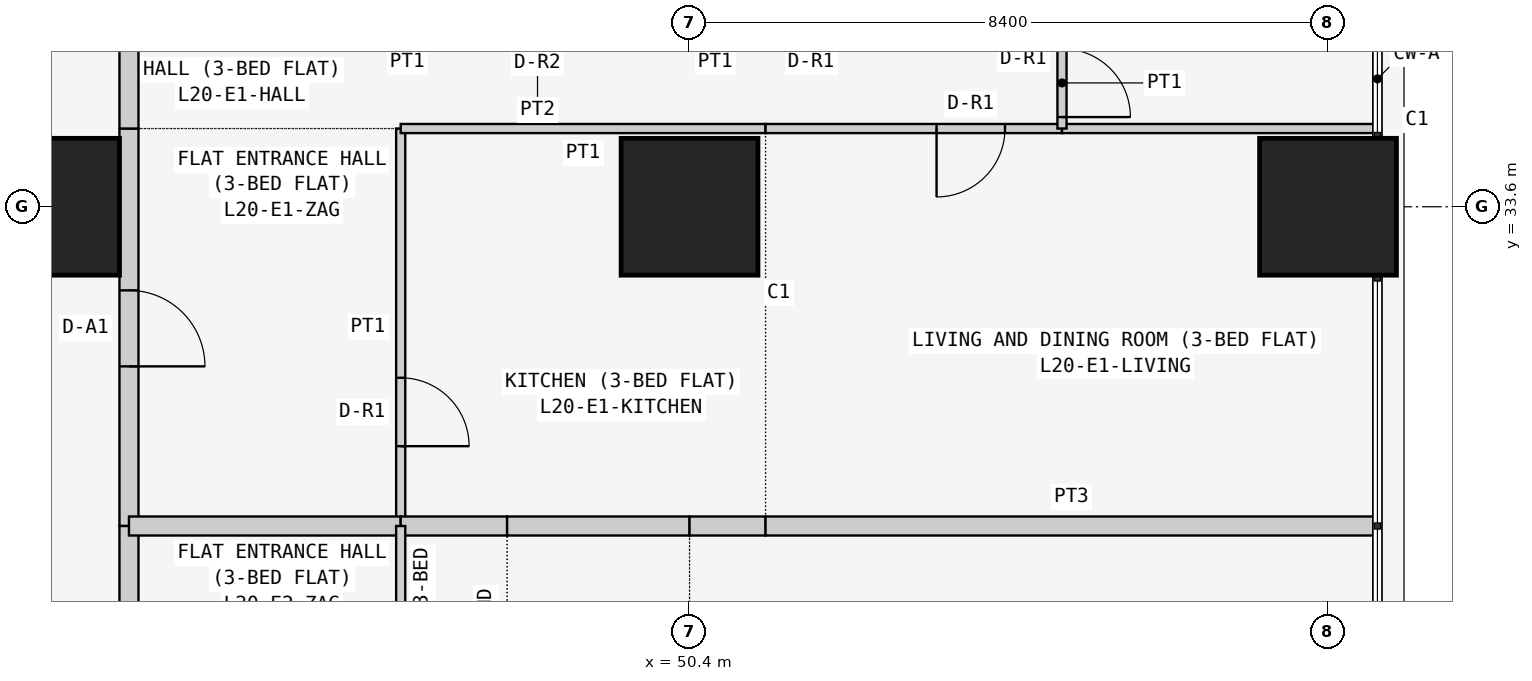
"""IFC4 building model, lengths in metres.
Left out: names, types, materials, properties, quantities, classifications, styles, units other than length and angle.
Written with IfcOpenShell. Run it as: python <this file> out.ifc"""

import sys

from ifc_helpers import new_model, si_unit, direction, frame, frame_2d, origin, origin_2d, place, context, subcontext, project, spatial, rectangle, extrude, element, fill, save


model = new_model("IFC4")
c1 = context("Model", 3, precision=1e-05, world=origin(), true_north=direction((0.0, 1.0)))
c2 = subcontext(c1, "Body", "Model", "MODEL_VIEW")
j1 = project(units=[si_unit("LENGTHUNIT", "METRE"), si_unit("PLANEANGLEUNIT", "RADIAN")], contexts=[c1])
p1 = place(None, origin())
s1 = spatial("IfcSite", under=j1, at=p1, CompositionType="ELEMENT")
p2 = place(p1, origin())
s2 = spatial("IfcBuilding", under=s1, at=p2, CompositionType="ELEMENT")
p3 = place(p2, frame((0.0, 0.0, 81.3)))
s3 = spatial("IfcBuildingStorey", under=s2, at=p3, CompositionType="ELEMENT", Elevation=81.3)
for number, where, z_axis, x_axis in (
    (1, (42.0, 33.6, 0.0), (0.0, 0.0, 1.0), (1.0, 0.0, 0.0)),
    (2, (50.4, 33.6, 0.0), (0.0, 0.0, 1.0), (1.0, 0.0, 0.0)),
    (3, (58.8, 33.6, 0.0), (0.0, 0.0, 1.0), (1.0, 0.0, 0.0)),
):
    element("IfcColumn", number, at=place(p3, frame(where, z_axis=z_axis, x_axis=x_axis)), inside=s3, PredefinedType="COLUMN", context=c2, shape_type="SweptSolid", body=[
        extrude(rectangle(XDim=1.8, YDim=1.8, at=origin_2d()), origin(), (0.0, 0.0, 1.0), 3.6),
    ])
p4 = place(p3, frame((43.025, 34.629, 0.0), z_axis=(0.0, 0.0, 1.0), x_axis=(0.0, -1.0, 0.0)))
e4 = element("IfcWall", 4, at=p4, inside=s3, PredefinedType="PARTITIONING", context=c2, shape_type="SweptSolid", body=[
    extrude(rectangle(XDim=5.229, YDim=0.25, at=frame_2d((2.615, 0.0))), origin(), (0.0, 0.0, 1.0), 3.45),
])
p5 = place(p4, frame((2.129, 0.0, 0.0)))
e5 = element("IfcOpeningElement", 5, at=p5, cuts=e4, PredefinedType="OPENING", context=c2, shape_type="SweptSolid", body=[
    extrude(rectangle(XDim=1.0, YDim=2.1, at=frame_2d((0.5, 1.05))), frame((0.0, 0.135, 0.0), z_axis=(0.0, -1.0, 0.0), x_axis=(1.0, 0.0, 0.0)), (0.0, 0.0, 1.0), 0.27),
])
p6 = place(p3, frame((43.025, 35.829, 0.0), z_axis=(0.0, 0.0, 1.0), x_axis=(0.0, -1.0, 0.0)))
e6 = element("IfcWall", 6, at=p6, inside=s3, PredefinedType="PARTITIONING", context=c2, shape_type="SweptSolid", body=[
    extrude(rectangle(XDim=1.2, YDim=0.25, at=frame_2d((0.6, 0.0))), origin(), (0.0, 0.0, 1.0), 3.45),
])
p7 = place(p3, frame((43.025, 29.4, 0.0), z_axis=(0.0, 0.0, 1.0), x_axis=(0.0, -1.0, 0.0)))
e7 = element("IfcWall", 7, at=p7, inside=s3, PredefinedType="PARTITIONING", context=c2, shape_type="SweptSolid", body=[
    extrude(rectangle(XDim=5.229, YDim=0.25, at=frame_2d((2.615, 0.0))), origin(), (0.0, 0.0, 1.0), 3.45),
])
p8 = place(p7, frame((2.1, 0.0, 0.0)))
e8 = element("IfcOpeningElement", 8, at=p8, cuts=e7, PredefinedType="OPENING", context=c2, shape_type="SweptSolid", body=[
    extrude(rectangle(XDim=1.0, YDim=2.1, at=frame_2d((0.5, 1.05))), frame((0.0, 0.135, 0.0), z_axis=(0.0, -1.0, 0.0), x_axis=(1.0, 0.0, 0.0)), (0.0, 0.0, 1.0), 0.27),
])
p9 = place(p3, frame((46.6, 29.4, 0.0), z_axis=(0.0, 0.0, 1.0), x_axis=(0.0, 1.0, 0.0)))
e9 = element("IfcWall", 9, at=p9, inside=s3, PredefinedType="PARTITIONING", context=c2, shape_type="SweptSolid", body=[
    extrude(rectangle(XDim=5.229, YDim=0.12, at=frame_2d((2.615, 0.0))), origin(), (0.0, 0.0, 1.0), 3.45),
])
p10 = place(p9, frame((1.05, 0.0, 0.0)))
e10 = element("IfcOpeningElement", 10, at=p10, cuts=e9, PredefinedType="OPENING", context=c2, shape_type="SweptSolid", body=[
    extrude(rectangle(XDim=0.9, YDim=2.1, at=frame_2d((0.45, 1.05))), frame((0.0, 0.07, 0.0), z_axis=(0.0, -1.0, 0.0), x_axis=(1.0, 0.0, 0.0)), (0.0, 0.0, 1.0), 0.14),
])
p11 = place(p3, frame((43.025, 29.4, 0.0), z_axis=(0.0, 0.0, 1.0), x_axis=(1.0, 0.0, 0.0)))
e11 = element("IfcWall", 11, at=p11, inside=s3, PredefinedType="PARTITIONING", context=c2, shape_type="SweptSolid", body=[
    extrude(rectangle(XDim=3.575, YDim=0.25, at=frame_2d((1.788, 0.0))), origin(), (0.0, 0.0, 1.0), 3.45),
])
p12 = place(p3, frame((51.4, 34.629, 0.0), z_axis=(0.0, 0.0, 1.0), x_axis=(-1.0, 0.0, 0.0)))
e12 = element("IfcWall", 12, at=p12, inside=s3, PredefinedType="PARTITIONING", context=c2, shape_type="SweptSolid", body=[
    extrude(rectangle(XDim=4.8, YDim=0.12, at=frame_2d((2.4, 0.0))), origin(), (0.0, 0.0, 1.0), 3.45),
])
p13 = place(p3, frame((46.6, 29.4, 0.0), z_axis=(0.0, 0.0, 1.0), x_axis=(1.0, 0.0, 0.0)))
e13 = element("IfcWall", 13, at=p13, inside=s3, PredefinedType="PARTITIONING", context=c2, shape_type="SweptSolid", body=[
    extrude(rectangle(XDim=1.4, YDim=0.25, at=frame_2d((0.7, 0.0))), origin(), (0.0, 0.0, 1.0), 3.45),
])
p14 = place(p3, frame((48.0, 29.4, 0.0), z_axis=(0.0, 0.0, 1.0), x_axis=(1.0, 0.0, 0.0)))
e14 = element("IfcWall", 14, at=p14, inside=s3, PredefinedType="PARTITIONING", context=c2, shape_type="SweptSolid", body=[
    extrude(rectangle(XDim=2.4, YDim=0.25, at=frame_2d((1.2, 0.0))), origin(), (0.0, 0.0, 1.0), 3.45),
])
p15 = place(p3, frame((50.4, 29.4, 0.0), z_axis=(0.0, 0.0, 1.0), x_axis=(1.0, 0.0, 0.0)))
e15 = element("IfcWall", 15, at=p15, inside=s3, PredefinedType="PARTITIONING", context=c2, shape_type="SweptSolid", body=[
    extrude(rectangle(XDim=1.0, YDim=0.25, at=frame_2d((0.5, 0.0))), origin(), (0.0, 0.0, 1.0), 3.45),
])
p16 = place(p3, frame((55.3, 34.629, 0.0), z_axis=(0.0, 0.0, 1.0), x_axis=(-1.0, 0.0, 0.0)))
e16 = element("IfcWall", 16, at=p16, inside=s3, PredefinedType="PARTITIONING", context=c2, shape_type="SweptSolid", body=[
    extrude(rectangle(XDim=3.9, YDim=0.12, at=frame_2d((1.95, 0.0))), origin(), (0.0, 0.0, 1.0), 3.45),
])
p17 = place(p16, frame((0.75, 0.0, 0.0)))
e17 = element("IfcOpeningElement", 17, at=p17, cuts=e16, PredefinedType="OPENING", context=c2, shape_type="SweptSolid", body=[
    extrude(rectangle(XDim=0.9, YDim=2.1, at=frame_2d((0.45, 1.05))), frame((0.0, 0.07, 0.0), z_axis=(0.0, -1.0, 0.0), x_axis=(1.0, 0.0, 0.0)), (0.0, 0.0, 1.0), 0.14),
])
p18 = place(p3, frame((59.45, 34.629, 0.0), z_axis=(0.0, 0.0, 1.0), x_axis=(-1.0, 0.0, 0.0)))
e18 = element("IfcWall", 18, at=p18, inside=s3, PredefinedType="PARTITIONING", context=c2, shape_type="SweptSolid", body=[
    extrude(rectangle(XDim=4.15, YDim=0.12, at=frame_2d((2.075, 0.0))), origin(), (0.0, 0.0, 1.0), 3.45),
])
p19 = place(p3, frame((51.4, 29.4, 0.0), z_axis=(0.0, 0.0, 1.0), x_axis=(1.0, 0.0, 0.0)))
e19 = element("IfcWall", 19, at=p19, inside=s3, PredefinedType="PARTITIONING", context=c2, shape_type="SweptSolid", body=[
    extrude(rectangle(XDim=8.05, YDim=0.25, at=frame_2d((4.025, 0.0))), origin(), (0.0, 0.0, 1.0), 3.45),
])
p20 = place(p3, frame((55.3, 34.629, 0.0), z_axis=(0.0, 0.0, 1.0), x_axis=(0.0, 1.0, 0.0)))
e20 = element("IfcWall", 20, at=p20, inside=s3, PredefinedType="PARTITIONING", context=c2, shape_type="SweptSolid", body=[
    extrude(rectangle(XDim=1.2, YDim=0.12, at=frame_2d((0.6, 0.0))), origin(), (0.0, 0.0, 1.0), 3.45),
])
p21 = place(p20, frame((0.151, 0.0, 0.0)))
e21 = element("IfcOpeningElement", 21, at=p21, cuts=e20, PredefinedType="OPENING", context=c2, shape_type="SweptSolid", body=[
    extrude(rectangle(XDim=0.9, YDim=2.1, at=frame_2d((0.45, 1.05))), frame((0.0, 0.07, 0.0), z_axis=(0.0, -1.0, 0.0), x_axis=(1.0, 0.0, 0.0)), (0.0, 0.0, 1.0), 0.14),
])
p22 = place(p3, frame((46.6, 29.4, 0.0), z_axis=(0.0, 0.0, 1.0), x_axis=(0.0, -1.0, 0.0)))
e22 = element("IfcWall", 22, at=p22, inside=s3, PredefinedType="PARTITIONING", context=c2, shape_type="SweptSolid", body=[
    extrude(rectangle(XDim=5.229, YDim=0.12, at=frame_2d((2.615, 0.0))), origin(), (0.0, 0.0, 1.0), 3.45),
])
p23 = place(p5, origin())
e23 = element("IfcDoor", 23, at=p23, inside=s3, OperationType="SINGLE_SWING_RIGHT", PredefinedType="DOOR", context=c2, shape_type="SweptSolid", body=[
    extrude(rectangle(XDim=1.0, YDim=2.1, at=frame_2d((0.5, 1.05))), frame((0.0, 0.025, 0.0), z_axis=(0.0, -1.0, 0.0), x_axis=(1.0, 0.0, 0.0)), (0.0, 0.0, 1.0), 0.05),
])
fill(e5, e23)
p24 = place(p10, frame((0.9, 0.0, 0.0), z_axis=(0.0, 0.0, 1.0), x_axis=(-1.0, 0.0, 0.0)))
e24 = element("IfcDoor", 24, at=p24, inside=s3, OperationType="SINGLE_SWING_RIGHT", PredefinedType="DOOR", context=c2, shape_type="SweptSolid", body=[
    extrude(rectangle(XDim=0.9, YDim=2.1, at=frame_2d((0.45, 1.05))), frame((0.0, 0.025, 0.0), z_axis=(0.0, -1.0, 0.0), x_axis=(1.0, 0.0, 0.0)), (0.0, 0.0, 1.0), 0.05),
])
fill(e10, e24)
p25 = place(p17, origin())
e25 = element("IfcDoor", 25, at=p25, inside=s3, OperationType="SINGLE_SWING_RIGHT", PredefinedType="DOOR", context=c2, shape_type="SweptSolid", body=[
    extrude(rectangle(XDim=0.9, YDim=2.1, at=frame_2d((0.45, 1.05))), frame((0.0, 0.025, 0.0), z_axis=(0.0, -1.0, 0.0), x_axis=(1.0, 0.0, 0.0)), (0.0, 0.0, 1.0), 0.05),
])
fill(e17, e25)
p26 = place(p21, frame((0.9, 0.0, 0.0), z_axis=(0.0, 0.0, 1.0), x_axis=(-1.0, 0.0, 0.0)))
e26 = element("IfcDoor", 26, at=p26, inside=s3, OperationType="SINGLE_SWING_RIGHT", PredefinedType="DOOR", context=c2, shape_type="SweptSolid", body=[
    extrude(rectangle(XDim=0.9, YDim=2.1, at=frame_2d((0.45, 1.05))), frame((0.0, 0.025, 0.0), z_axis=(0.0, -1.0, 0.0), x_axis=(1.0, 0.0, 0.0)), (0.0, 0.0, 1.0), 0.05),
])
fill(e21, e26)
save(model, sys.argv[1])
